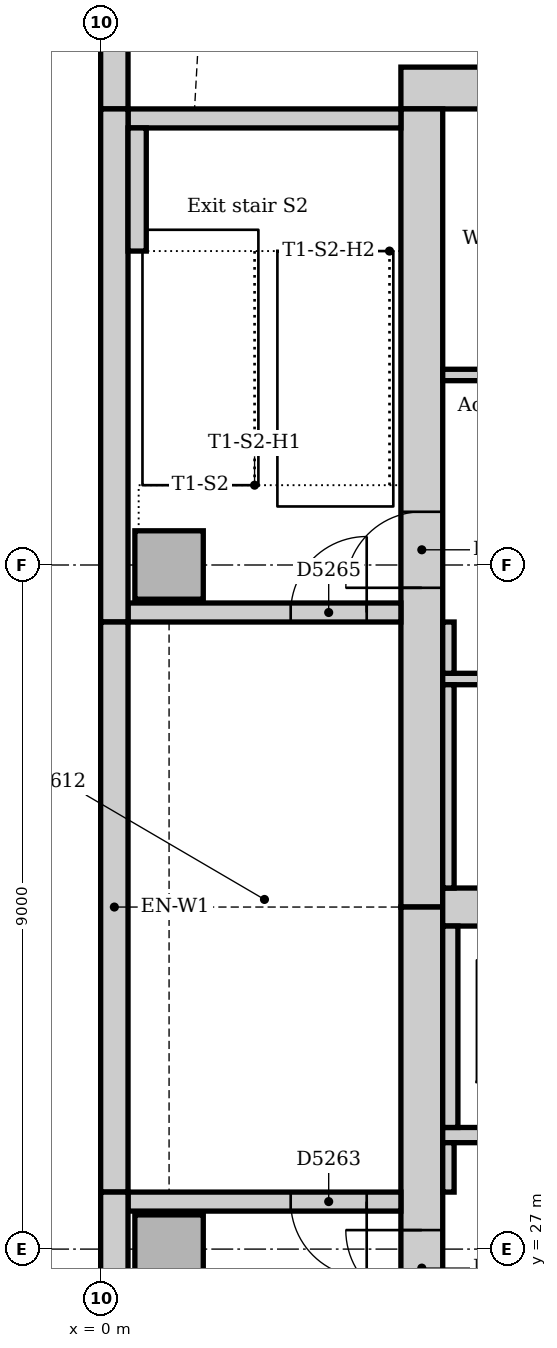
"""IFC4 building model, lengths in metres.
Left out: names, types, materials, properties, quantities, classifications, styles, units other than length and angle.
Written with IfcOpenShell. Run it as: python <this file> out.ifc"""

import sys

from ifc_helpers import new_model, si_unit, direction, frame, frame_2d, origin, origin_2d, place, context, subcontext, project, spatial, rectangle, extrude, element, fill, save


model = new_model("IFC4")
c1 = context("Model", 3, precision=1e-05, world=origin(), true_north=direction((0.0, 1.0)))
c2 = subcontext(c1, "Body", "Model", "MODEL_VIEW")
j1 = project(units=[si_unit("LENGTHUNIT", "METRE"), si_unit("PLANEANGLEUNIT", "RADIAN")], contexts=[c1])
p1 = place(None, origin())
s1 = spatial("IfcSite", under=j1, at=p1, CompositionType="ELEMENT")
p2 = place(p1, origin())
s2 = spatial("IfcBuilding", under=s1, at=p2, CompositionType="ELEMENT")
p3 = place(p2, frame((0.0, 0.0, 234.0)))
s3 = spatial("IfcBuildingStorey", under=s2, at=p3, CompositionType="ELEMENT", Elevation=234.0)
p4 = place(p3, frame((23.05, 42.275, 0.0), z_axis=(0.0, 0.0, 1.0), x_axis=(-1.0, 0.0, 0.0)))
e1 = element("IfcWall", 1, at=p4, inside=s3, PredefinedType="SOLIDWALL", context=c2, shape_type="SweptSolid", body=[
    extrude(rectangle(XDim=19.1, YDim=0.55, at=frame_2d((9.55, 0.0))), origin(), (0.0, 0.0, 1.0), 4.0),
])
p5 = place(p3, frame((4.225, 42.0, 0.0), z_axis=(0.0, 0.0, 1.0), x_axis=(0.0, -1.0, 0.0)))
e2 = element("IfcWall", 2, at=p5, inside=s3, PredefinedType="SOLIDWALL", context=c2, shape_type="SweptSolid", body=[
    extrude(rectangle(XDim=10.5, YDim=0.55, at=frame_2d((5.25, 0.0))), origin(), (0.0, 0.0, 1.0), 4.0),
])
p6 = place(p5, frame((5.3, 0.0, 0.0)))
e3 = element("IfcOpeningElement", 3, at=p6, cuts=e2, PredefinedType="OPENING", context=c2, shape_type="SweptSolid", body=[
    extrude(rectangle(XDim=1.0, YDim=2.1, at=frame_2d((0.5, 1.05))), frame((0.0, 0.285, 0.0), z_axis=(0.0, -1.0, 0.0), x_axis=(1.0, 0.0, 0.0)), (0.0, 0.0, 1.0), 0.57),
])
p7 = place(p3, frame((4.225, 31.5, 0.0), z_axis=(0.0, 0.0, 1.0), x_axis=(0.0, -1.0, 0.0)))
e4 = element("IfcWall", 4, at=p7, inside=s3, PredefinedType="SOLIDWALL", context=c2, shape_type="SweptSolid", body=[
    extrude(rectangle(XDim=10.5, YDim=0.55, at=frame_2d((5.25, 0.0))), origin(), (0.0, 0.0, 1.0), 4.0),
])
p8 = place(p7, frame((4.25, 0.0, 0.0)))
e5 = element("IfcOpeningElement", 5, at=p8, cuts=e4, PredefinedType="OPENING", context=c2, shape_type="SweptSolid", body=[
    extrude(rectangle(XDim=1.0, YDim=2.1, at=frame_2d((0.5, 1.05))), frame((0.0, 0.285, 0.0), z_axis=(0.0, -1.0, 0.0), x_axis=(1.0, 0.0, 0.0)), (0.0, 0.0, 1.0), 0.57),
])
p9 = place(p3, frame((4.5, 31.5, 0.0), z_axis=(0.0, 0.0, 1.0), x_axis=(1.0, 0.0, 0.0)))
e6 = element("IfcWall", 6, at=p9, inside=s3, PredefinedType="SOLIDWALL", context=c2, shape_type="SweptSolid", body=[
    extrude(rectangle(XDim=18.0, YDim=0.5, at=frame_2d((9.0, 0.0))), origin(), (0.0, 0.0, 1.0), 4.0),
])
p10 = place(p3, frame((3.95, 27.625, 0.0), z_axis=(0.0, 0.0, 1.0), x_axis=(-1.0, 0.0, 0.0)))
e7 = element("IfcWall", 7, at=p10, inside=s3, PredefinedType="SOLIDWALL", context=c2, shape_type="SweptSolid", body=[
    extrude(rectangle(XDim=3.59, YDim=0.25, at=frame_2d((1.795, 0.0))), origin(), (0.0, 0.0, 1.0), 4.0),
])
p11 = place(p10, frame((0.45, 0.0, 0.0)))
e8 = element("IfcOpeningElement", 8, at=p11, cuts=e7, PredefinedType="OPENING", context=c2, shape_type="SweptSolid", body=[
    extrude(rectangle(XDim=1.0, YDim=2.1, at=frame_2d((0.5, 1.05))), frame((0.0, 0.135, 0.0), z_axis=(0.0, -1.0, 0.0), x_axis=(1.0, 0.0, 0.0)), (0.0, 0.0, 1.0), 0.27),
])
p12 = place(p3, frame((0.36, 35.375, 0.0), z_axis=(0.0, 0.0, 1.0), x_axis=(1.0, 0.0, 0.0)))
e9 = element("IfcWall", 9, at=p12, inside=s3, PredefinedType="SOLIDWALL", context=c2, shape_type="SweptSolid", body=[
    extrude(rectangle(XDim=3.59, YDim=0.25, at=frame_2d((1.795, 0.0))), origin(), (0.0, 0.0, 1.0), 4.0),
])
p13 = place(p12, frame((2.14, 0.0, 0.0)))
e10 = element("IfcOpeningElement", 10, at=p13, cuts=e9, PredefinedType="OPENING", context=c2, shape_type="SweptSolid", body=[
    extrude(rectangle(XDim=1.0, YDim=2.1, at=frame_2d((0.5, 1.05))), frame((0.0, 0.135, 0.0), z_axis=(0.0, -1.0, 0.0), x_axis=(1.0, 0.0, 0.0)), (0.0, 0.0, 1.0), 0.27),
])
p14 = place(p3, frame((3.95, 41.875, 0.0), z_axis=(0.0, 0.0, 1.0), x_axis=(-1.0, 0.0, 0.0)))
e11 = element("IfcWall", 11, at=p14, inside=s3, PredefinedType="SOLIDWALL", context=c2, shape_type="SweptSolid", body=[
    extrude(rectangle(XDim=3.59, YDim=0.25, at=frame_2d((1.795, 0.0))), origin(), (0.0, 0.0, 1.0), 4.0),
])
for number, where, z_axis, x_axis in (
    (12, (0.9, 27.0, 0.0), (0.0, 0.0, 1.0), (1.0, 0.0, 0.0)),
    (13, (0.9, 36.0, 0.0), (0.0, 0.0, 1.0), (1.0, 0.0, 0.0)),
):
    element("IfcColumn", number, at=place(p3, frame(where, z_axis=z_axis, x_axis=x_axis)), inside=s3, PredefinedType="COLUMN", context=c2, shape_type="SweptSolid", body=[
        extrude(rectangle(XDim=0.9, YDim=0.9, at=origin_2d()), origin(), (0.0, 0.0, 1.0), 4.0),
    ])
p15 = place(p3, frame((0.18, 54.257, 0.0), z_axis=(0.0, 0.0, 1.0), x_axis=(0.0, -1.0, 0.0)))
e14 = element("IfcWall", 14, at=p15, inside=s3, PredefinedType="STANDARD", context=c2, shape_type="SweptSolid", body=[
    extrude(rectangle(XDim=12.257, YDim=0.36, at=frame_2d((6.129, 0.0))), origin(), (0.0, 0.0, 1.0), 3.85),
])
p16 = place(p15, frame((3.107, 0.0, 0.9)))
e15 = element("IfcOpeningElement", 15, at=p16, cuts=e14, PredefinedType="OPENING", context=c2, shape_type="SweptSolid", body=[
    extrude(rectangle(XDim=3.3, YDim=1.6, at=frame_2d((1.65, 0.8))), frame((0.0, 0.19, 0.0), z_axis=(0.0, -1.0, 0.0), x_axis=(1.0, 0.0, 0.0)), (0.0, 0.0, 1.0), 0.38),
])
p17 = place(p15, frame((7.607, 0.0, 0.9)))
e16 = element("IfcOpeningElement", 16, at=p17, cuts=e14, PredefinedType="OPENING", context=c2, shape_type="SweptSolid", body=[
    extrude(rectangle(XDim=3.3, YDim=1.6, at=frame_2d((1.65, 0.8))), frame((0.0, 0.19, 0.0), z_axis=(0.0, -1.0, 0.0), x_axis=(1.0, 0.0, 0.0)), (0.0, 0.0, 1.0), 0.38),
])
p18 = place(p3, frame((0.18, 42.0, 0.0), z_axis=(0.0, 0.0, 1.0), x_axis=(0.0, -1.0, 0.0)))
e17 = element("IfcWall", 17, at=p18, inside=s3, PredefinedType="STANDARD", context=c2, shape_type="SweptSolid", body=[
    extrude(rectangle(XDim=6.75, YDim=0.36, at=frame_2d((3.375, 0.0))), origin(), (0.0, 0.0, 1.0), 3.85),
])
p19 = place(p3, frame((0.18, 35.25, 0.0), z_axis=(0.0, 0.0, 1.0), x_axis=(0.0, -1.0, 0.0)))
e18 = element("IfcWall", 18, at=p19, inside=s3, PredefinedType="STANDARD", context=c2, shape_type="SweptSolid", body=[
    extrude(rectangle(XDim=7.5, YDim=0.36, at=frame_2d((3.75, 0.0))), origin(), (0.0, 0.0, 1.0), 3.85),
])
p20 = place(p3, frame((0.18, 27.75, 0.0), z_axis=(0.0, 0.0, 1.0), x_axis=(0.0, -1.0, 0.0)))
e19 = element("IfcWall", 19, at=p20, inside=s3, PredefinedType="STANDARD", context=c2, shape_type="SweptSolid", body=[
    extrude(rectangle(XDim=6.75, YDim=0.36, at=frame_2d((3.375, 0.0))), origin(), (0.0, 0.0, 1.0), 3.85),
])
p21 = place(p3, frame((0.48, 40.13, 0.0), z_axis=(0.0, 0.0, 1.0), x_axis=(0.0, 1.0, 0.0)))
e20 = element("IfcWall", 20, at=p21, inside=s3, PredefinedType="STANDARD", context=c2, shape_type="SweptSolid", body=[
    extrude(rectangle(XDim=1.62, YDim=0.24, at=frame_2d((0.81, 0.0))), origin(), (0.0, 0.0, 1.0), 4.0),
])
p22 = place(p3, frame((4.5, 28.5, 0.0), z_axis=(0.0, 0.0, 1.0), x_axis=(1.0, 0.0, 0.0)))
e21 = element("IfcWall", 21, at=p22, inside=s3, PredefinedType="PARTITIONING", context=c2, shape_type="SweptSolid", body=[
    extrude(rectangle(XDim=18.0, YDim=0.2, at=frame_2d((9.0, 0.0))), origin(), (0.0, 0.0, 1.0), 3.85),
])
p23 = place(p22, frame((0.95, 0.0, 0.0)))
e22 = element("IfcOpeningElement", 22, at=p23, cuts=e21, PredefinedType="OPENING", context=c2, shape_type="SweptSolid", body=[
    extrude(rectangle(XDim=1.1, YDim=2.1, at=frame_2d((0.55, 1.05))), frame((0.0, 0.11, 0.0), z_axis=(0.0, -1.0, 0.0), x_axis=(1.0, 0.0, 0.0)), (0.0, 0.0, 1.0), 0.22),
])
p24 = place(p22, frame((3.95, 0.0, 0.0)))
e23 = element("IfcOpeningElement", 23, at=p24, cuts=e21, PredefinedType="OPENING", context=c2, shape_type="SweptSolid", body=[
    extrude(rectangle(XDim=1.1, YDim=2.1, at=frame_2d((0.55, 1.05))), frame((0.0, 0.11, 0.0), z_axis=(0.0, -1.0, 0.0), x_axis=(1.0, 0.0, 0.0)), (0.0, 0.0, 1.0), 0.22),
])
p25 = place(p22, frame((6.95, 0.0, 0.0)))
e24 = element("IfcOpeningElement", 24, at=p25, cuts=e21, PredefinedType="OPENING", context=c2, shape_type="SweptSolid", body=[
    extrude(rectangle(XDim=1.1, YDim=2.1, at=frame_2d((0.55, 1.05))), frame((0.0, 0.11, 0.0), z_axis=(0.0, -1.0, 0.0), x_axis=(1.0, 0.0, 0.0)), (0.0, 0.0, 1.0), 0.22),
])
p26 = place(p22, frame((9.95, 0.0, 0.0)))
e25 = element("IfcOpeningElement", 25, at=p26, cuts=e21, PredefinedType="OPENING", context=c2, shape_type="SweptSolid", body=[
    extrude(rectangle(XDim=1.1, YDim=2.1, at=frame_2d((0.55, 1.05))), frame((0.0, 0.11, 0.0), z_axis=(0.0, -1.0, 0.0), x_axis=(1.0, 0.0, 0.0)), (0.0, 0.0, 1.0), 0.22),
])
p27 = place(p22, frame((12.95, 0.0, 0.0)))
e26 = element("IfcOpeningElement", 26, at=p27, cuts=e21, PredefinedType="OPENING", context=c2, shape_type="SweptSolid", body=[
    extrude(rectangle(XDim=1.1, YDim=2.1, at=frame_2d((0.55, 1.05))), frame((0.0, 0.11, 0.0), z_axis=(0.0, -1.0, 0.0), x_axis=(1.0, 0.0, 0.0)), (0.0, 0.0, 1.0), 0.22),
])
p28 = place(p22, frame((15.95, 0.0, 0.0)))
e27 = element("IfcOpeningElement", 27, at=p28, cuts=e21, PredefinedType="OPENING", context=c2, shape_type="SweptSolid", body=[
    extrude(rectangle(XDim=1.1, YDim=2.1, at=frame_2d((0.55, 1.05))), frame((0.0, 0.11, 0.0), z_axis=(0.0, -1.0, 0.0), x_axis=(1.0, 0.0, 0.0)), (0.0, 0.0, 1.0), 0.22),
])
p29 = place(p3, frame((4.6, 28.6, 0.0), z_axis=(0.0, 0.0, 1.0), x_axis=(0.0, 1.0, 0.0)))
e28 = element("IfcWall", 28, at=p29, inside=s3, PredefinedType="PARTITIONING", context=c2, shape_type="SweptSolid", body=[
    extrude(rectangle(XDim=2.65, YDim=0.2, at=frame_2d((1.325, 0.0))), origin(), (0.0, 0.0, 1.0), 3.85),
])
p30 = place(p3, frame((4.5, 38.5, 0.0), z_axis=(0.0, 0.0, 1.0), x_axis=(1.0, 0.0, 0.0)))
e29 = element("IfcWall", 29, at=p30, inside=s3, PredefinedType="PARTITIONING", context=c2, shape_type="SweptSolid", body=[
    extrude(rectangle(XDim=11.9, YDim=0.15, at=frame_2d((5.95, 0.0))), origin(), (0.0, 0.0, 1.0), 3.85),
])
p31 = place(p30, frame((1.1, 0.0, 0.0)))
e30 = element("IfcOpeningElement", 30, at=p31, cuts=e29, PredefinedType="OPENING", context=c2, shape_type="SweptSolid", body=[
    extrude(rectangle(XDim=0.9, YDim=2.1, at=frame_2d((0.45, 1.05))), frame((0.0, 0.085, 0.0), z_axis=(0.0, -1.0, 0.0), x_axis=(1.0, 0.0, 0.0)), (0.0, 0.0, 1.0), 0.17),
])
p32 = place(p30, frame((4.05, 0.0, 0.0)))
e31 = element("IfcOpeningElement", 31, at=p32, cuts=e29, PredefinedType="OPENING", context=c2, shape_type="SweptSolid", body=[
    extrude(rectangle(XDim=0.9, YDim=2.1, at=frame_2d((0.45, 1.05))), frame((0.0, 0.085, 0.0), z_axis=(0.0, -1.0, 0.0), x_axis=(1.0, 0.0, 0.0)), (0.0, 0.0, 1.0), 0.17),
])
p33 = place(p30, frame((7.05, 0.0, 0.0)))
e32 = element("IfcOpeningElement", 32, at=p33, cuts=e29, PredefinedType="OPENING", context=c2, shape_type="SweptSolid", body=[
    extrude(rectangle(XDim=0.9, YDim=2.1, at=frame_2d((0.45, 1.05))), frame((0.0, 0.085, 0.0), z_axis=(0.0, -1.0, 0.0), x_axis=(1.0, 0.0, 0.0)), (0.0, 0.0, 1.0), 0.17),
])
p34 = place(p30, frame((9.95, 0.0, 0.0)))
e33 = element("IfcOpeningElement", 33, at=p34, cuts=e29, PredefinedType="OPENING", context=c2, shape_type="SweptSolid", body=[
    extrude(rectangle(XDim=0.8, YDim=2.1, at=frame_2d((0.4, 1.05))), frame((0.0, 0.085, 0.0), z_axis=(0.0, -1.0, 0.0), x_axis=(1.0, 0.0, 0.0)), (0.0, 0.0, 1.0), 0.17),
])
p35 = place(p3, frame((4.5, 34.5, 0.0), z_axis=(0.0, 0.0, 1.0), x_axis=(1.0, 0.0, 0.0)))
e34 = element("IfcWall", 34, at=p35, inside=s3, PredefinedType="PARTITIONING", context=c2, shape_type="SweptSolid", body=[
    extrude(rectangle(XDim=5.9, YDim=0.15, at=frame_2d((2.95, 0.0))), origin(), (0.0, 0.0, 1.0), 3.85),
])
p36 = place(p35, frame((2.5, 0.0, 0.0)))
e35 = element("IfcOpeningElement", 35, at=p36, cuts=e34, PredefinedType="OPENING", context=c2, shape_type="SweptSolid", body=[
    extrude(rectangle(XDim=0.9, YDim=2.1, at=frame_2d((0.45, 1.05))), frame((0.0, 0.085, 0.0), z_axis=(0.0, -1.0, 0.0), x_axis=(1.0, 0.0, 0.0)), (0.0, 0.0, 1.0), 0.17),
])
p37 = place(p3, frame((4.575, 34.575, 0.0), z_axis=(0.0, 0.0, 1.0), x_axis=(0.0, 1.0, 0.0)))
e36 = element("IfcWall", 36, at=p37, inside=s3, PredefinedType="PARTITIONING", context=c2, shape_type="SweptSolid", body=[
    extrude(rectangle(XDim=0.675, YDim=0.15, at=frame_2d((0.338, 0.0))), origin(), (0.0, 0.0, 1.0), 3.85),
])
p38 = place(p3, frame((4.575, 31.75, 0.0), z_axis=(0.0, 0.0, 1.0), x_axis=(0.0, 1.0, 0.0)))
e37 = element("IfcWall", 37, at=p38, inside=s3, PredefinedType="PARTITIONING", context=c2, shape_type="SweptSolid", body=[
    extrude(rectangle(XDim=2.675, YDim=0.15, at=frame_2d((1.337, 0.0))), origin(), (0.0, 0.0, 1.0), 3.85),
])
p39 = place(p3, frame((4.575, 27.75, 0.0), z_axis=(0.0, 0.0, 1.0), x_axis=(0.0, 1.0, 0.0)))
e38 = element("IfcWall", 38, at=p39, inside=s3, PredefinedType="PARTITIONING", context=c2, shape_type="SweptSolid", body=[
    extrude(rectangle(XDim=0.65, YDim=0.15, at=frame_2d((0.325, 0.0))), origin(), (0.0, 0.0, 1.0), 3.85),
])
p40 = place(p8, frame((1.0, 0.0, 0.0), z_axis=(0.0, 0.0, 1.0), x_axis=(-1.0, 0.0, 0.0)))
e39 = element("IfcDoor", 39, at=p40, inside=s3, OperationType="SINGLE_SWING_RIGHT", PredefinedType="DOOR", context=c2, shape_type="SweptSolid", body=[
    extrude(rectangle(XDim=1.0, YDim=2.1, at=frame_2d((0.5, 1.05))), frame((0.0, 0.025, 0.0), z_axis=(0.0, -1.0, 0.0), x_axis=(1.0, 0.0, 0.0)), (0.0, 0.0, 1.0), 0.05),
])
fill(e5, e39)
p41 = place(p11, origin())
e40 = element("IfcDoor", 40, at=p41, inside=s3, OperationType="SINGLE_SWING_LEFT", PredefinedType="DOOR", context=c2, shape_type="SweptSolid", body=[
    extrude(rectangle(XDim=1.0, YDim=2.1, at=frame_2d((0.5, 1.05))), frame((0.0, 0.025, 0.0), z_axis=(0.0, -1.0, 0.0), x_axis=(1.0, 0.0, 0.0)), (0.0, 0.0, 1.0), 0.05),
])
fill(e8, e40)
p42 = place(p6, frame((1.0, 0.0, 0.0), z_axis=(0.0, 0.0, 1.0), x_axis=(-1.0, 0.0, 0.0)))
e41 = element("IfcDoor", 41, at=p42, inside=s3, OperationType="SINGLE_SWING_LEFT", PredefinedType="DOOR", context=c2, shape_type="SweptSolid", body=[
    extrude(rectangle(XDim=1.0, YDim=2.1, at=frame_2d((0.5, 1.05))), frame((0.0, 0.025, 0.0), z_axis=(0.0, -1.0, 0.0), x_axis=(1.0, 0.0, 0.0)), (0.0, 0.0, 1.0), 0.05),
])
fill(e3, e41)
p43 = place(p13, origin())
e42 = element("IfcDoor", 42, at=p43, inside=s3, OperationType="SINGLE_SWING_RIGHT", PredefinedType="DOOR", context=c2, shape_type="SweptSolid", body=[
    extrude(rectangle(XDim=1.0, YDim=2.1, at=frame_2d((0.5, 1.05))), frame((0.0, 0.025, 0.0), z_axis=(0.0, -1.0, 0.0), x_axis=(1.0, 0.0, 0.0)), (0.0, 0.0, 1.0), 0.05),
])
fill(e10, e42)
save(model, sys.argv[1])
